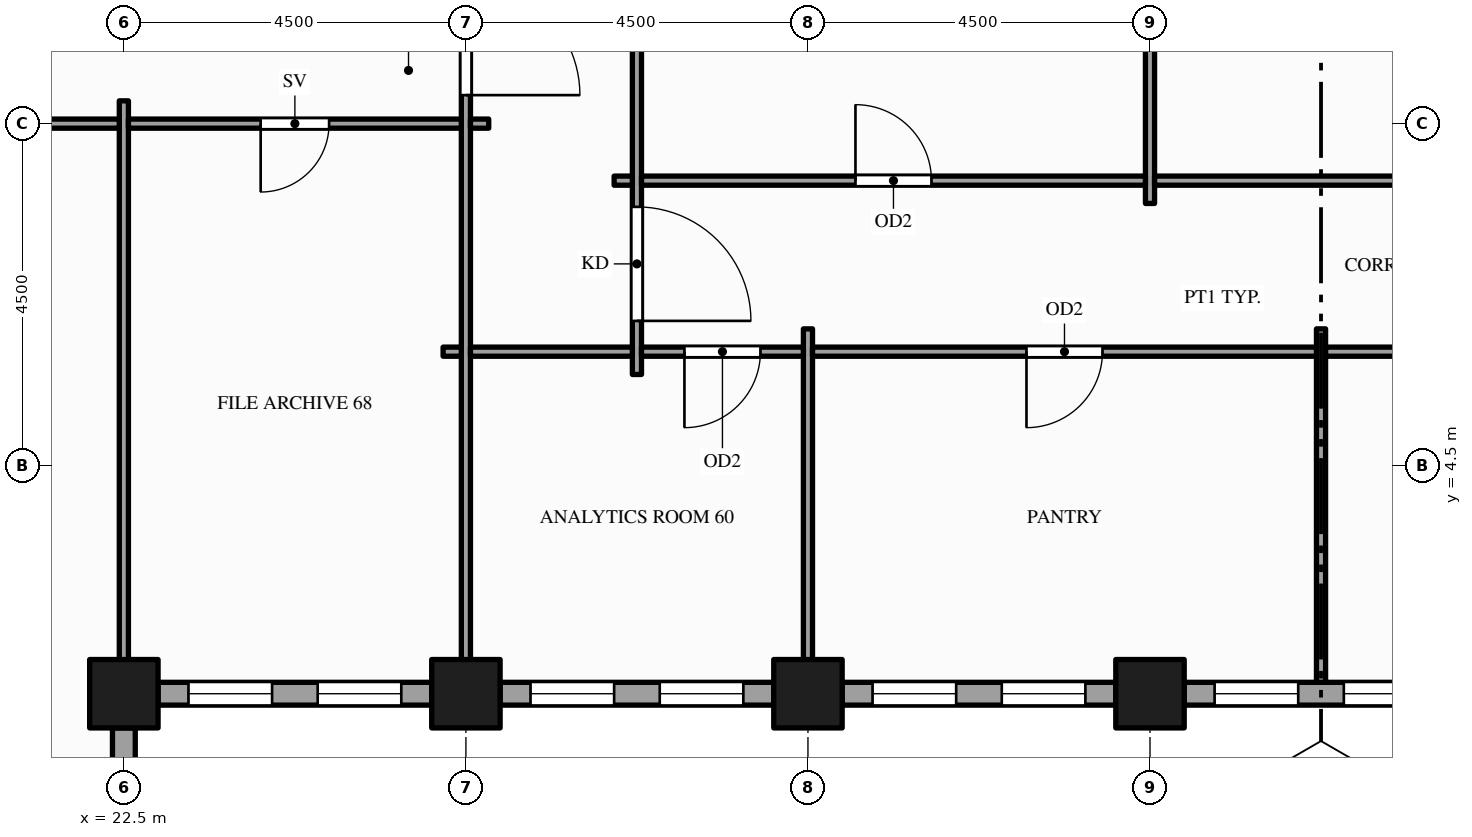
"""IFC4 building model, lengths in metres.
Left out: names, types, materials, properties, quantities, classifications, styles, units other than length and angle.
Written with IfcOpenShell. Run it as: python <this file> out.ifc"""

import sys

from ifc_helpers import new_model, si_unit, direction, frame, frame_2d, origin, origin_2d, place, context, subcontext, project, spatial, rectangle, hollow_rectangle, extrude, element, fill, save


model = new_model("IFC4")
c1 = context("Model", 3, precision=1e-05, world=origin(), true_north=direction((0.0, 1.0)))
c2 = subcontext(c1, "Body", "Model", "MODEL_VIEW")
j1 = project(units=[si_unit("LENGTHUNIT", "METRE"), si_unit("PLANEANGLEUNIT", "RADIAN")], contexts=[c1])
p1 = place(None, origin())
s1 = spatial("IfcSite", under=j1, at=p1, CompositionType="ELEMENT")
p2 = place(p1, origin())
s2 = spatial("IfcBuilding", under=s1, at=p2, CompositionType="ELEMENT")
p3 = place(p2, frame((0.0, 0.0, 179.0)))
s3 = spatial("IfcBuildingStorey", under=s2, at=p3, CompositionType="ELEMENT", Elevation=179.0)
for number, where, z_axis, x_axis in (
    (1, (22.5, 1.5, -0.15), (0.0, 0.0, 1.0), (1.0, 0.0, 0.0)),
    (2, (27.0, 1.5, -0.15), (0.0, 0.0, 1.0), (1.0, 0.0, 0.0)),
    (3, (31.5, 1.5, -0.15), (0.0, 0.0, 1.0), (1.0, 0.0, 0.0)),
    (4, (36.0, 1.5, -0.15), (0.0, 0.0, 1.0), (1.0, 0.0, 0.0)),
):
    element("IfcColumn", number, at=place(p3, frame(where, z_axis=z_axis, x_axis=x_axis)), inside=s3, PredefinedType="COLUMN", context=c2, shape_type="SweptSolid", body=[
        extrude(hollow_rectangle(XDim=0.9, YDim=0.9, WallThickness=0.045, at=origin_2d()), origin(), (0.0, 0.0, 1.0), 4.0),
    ])
p4 = place(p3, frame((22.5, 0.45, 0.0), z_axis=(0.0, 0.0, 1.0), x_axis=(0.0, 1.0, 0.0)))
e5 = element("IfcWall", 5, at=p4, inside=s3, PredefinedType="STANDARD", context=c2, shape_type="SweptSolid", body=[
    extrude(rectangle(XDim=0.6, YDim=0.3, at=frame_2d((0.3, 0.0))), origin(), (0.0, 0.0, 1.0), 3.149),
])
p5 = place(p3, frame((22.95, 1.5, 0.0), z_axis=(0.0, 0.0, 1.0), x_axis=(1.0, 0.0, 0.0)))
e6 = element("IfcWall", 6, at=p5, inside=s3, PredefinedType="STANDARD", context=c2, shape_type="SweptSolid", body=[
    extrude(rectangle(XDim=3.6, YDim=0.3, at=frame_2d((1.8, 0.0))), origin(), (0.0, 0.0, 1.0), 2.87),
])
p6 = place(p5, frame((0.4, 0.0, 0.9)))
e7 = element("IfcOpeningElement", 7, at=p6, cuts=e6, PredefinedType="OPENING", context=c2, shape_type="SweptSolid", body=[
    extrude(rectangle(XDim=1.1, YDim=1.75, at=frame_2d((0.55, 0.875))), frame((0.0, 0.16, 0.0), z_axis=(0.0, -1.0, 0.0), x_axis=(1.0, 0.0, 0.0)), (0.0, 0.0, 1.0), 0.32),
])
p7 = place(p5, frame((2.1, 0.0, 0.9)))
e8 = element("IfcOpeningElement", 8, at=p7, cuts=e6, PredefinedType="OPENING", context=c2, shape_type="SweptSolid", body=[
    extrude(rectangle(XDim=1.1, YDim=1.75, at=frame_2d((0.55, 0.875))), frame((0.0, 0.16, 0.0), z_axis=(0.0, -1.0, 0.0), x_axis=(1.0, 0.0, 0.0)), (0.0, 0.0, 1.0), 0.32),
])
p8 = place(p3, frame((27.45, 1.5, 0.0), z_axis=(0.0, 0.0, 1.0), x_axis=(1.0, 0.0, 0.0)))
e9 = element("IfcWall", 9, at=p8, inside=s3, PredefinedType="STANDARD", context=c2, shape_type="SweptSolid", body=[
    extrude(rectangle(XDim=3.6, YDim=0.3, at=frame_2d((1.8, 0.0))), origin(), (0.0, 0.0, 1.0), 2.87),
])
p9 = place(p8, frame((0.4, 0.0, 0.9)))
e10 = element("IfcOpeningElement", 10, at=p9, cuts=e9, PredefinedType="OPENING", context=c2, shape_type="SweptSolid", body=[
    extrude(rectangle(XDim=1.1, YDim=1.75, at=frame_2d((0.55, 0.875))), frame((0.0, 0.16, 0.0), z_axis=(0.0, -1.0, 0.0), x_axis=(1.0, 0.0, 0.0)), (0.0, 0.0, 1.0), 0.32),
])
p10 = place(p8, frame((2.1, 0.0, 0.9)))
e11 = element("IfcOpeningElement", 11, at=p10, cuts=e9, PredefinedType="OPENING", context=c2, shape_type="SweptSolid", body=[
    extrude(rectangle(XDim=1.1, YDim=1.75, at=frame_2d((0.55, 0.875))), frame((0.0, 0.16, 0.0), z_axis=(0.0, -1.0, 0.0), x_axis=(1.0, 0.0, 0.0)), (0.0, 0.0, 1.0), 0.32),
])
p11 = place(p3, frame((31.95, 1.5, 0.0), z_axis=(0.0, 0.0, 1.0), x_axis=(1.0, 0.0, 0.0)))
e12 = element("IfcWall", 12, at=p11, inside=s3, PredefinedType="STANDARD", context=c2, shape_type="SweptSolid", body=[
    extrude(rectangle(XDim=3.6, YDim=0.3, at=frame_2d((1.8, 0.0))), origin(), (0.0, 0.0, 1.0), 2.87),
])
p12 = place(p11, frame((0.4, 0.0, 0.9)))
e13 = element("IfcOpeningElement", 13, at=p12, cuts=e12, PredefinedType="OPENING", context=c2, shape_type="SweptSolid", body=[
    extrude(rectangle(XDim=1.1, YDim=1.75, at=frame_2d((0.55, 0.875))), frame((0.0, 0.16, 0.0), z_axis=(0.0, -1.0, 0.0), x_axis=(1.0, 0.0, 0.0)), (0.0, 0.0, 1.0), 0.32),
])
p13 = place(p11, frame((2.1, 0.0, 0.9)))
e14 = element("IfcOpeningElement", 14, at=p13, cuts=e12, PredefinedType="OPENING", context=c2, shape_type="SweptSolid", body=[
    extrude(rectangle(XDim=1.1, YDim=1.75, at=frame_2d((0.55, 0.875))), frame((0.0, 0.16, 0.0), z_axis=(0.0, -1.0, 0.0), x_axis=(1.0, 0.0, 0.0)), (0.0, 0.0, 1.0), 0.32),
])
p14 = place(p3, frame((36.45, 1.5, 0.0), z_axis=(0.0, 0.0, 1.0), x_axis=(1.0, 0.0, 0.0)))
e15 = element("IfcWall", 15, at=p14, inside=s3, PredefinedType="STANDARD", context=c2, shape_type="SweptSolid", body=[
    extrude(rectangle(XDim=3.6, YDim=0.3, at=frame_2d((1.8, 0.0))), origin(), (0.0, 0.0, 1.0), 2.87),
])
p15 = place(p14, frame((0.4, 0.0, 0.9)))
e16 = element("IfcOpeningElement", 16, at=p15, cuts=e15, PredefinedType="OPENING", context=c2, shape_type="SweptSolid", body=[
    extrude(rectangle(XDim=1.1, YDim=1.75, at=frame_2d((0.55, 0.875))), frame((0.0, 0.16, 0.0), z_axis=(0.0, -1.0, 0.0), x_axis=(1.0, 0.0, 0.0)), (0.0, 0.0, 1.0), 0.32),
])
p16 = place(p14, frame((2.1, 0.0, 0.9)))
e17 = element("IfcOpeningElement", 17, at=p16, cuts=e15, PredefinedType="OPENING", context=c2, shape_type="SweptSolid", body=[
    extrude(rectangle(XDim=1.1, YDim=1.75, at=frame_2d((0.55, 0.875))), frame((0.0, 0.16, 0.0), z_axis=(0.0, -1.0, 0.0), x_axis=(1.0, 0.0, 0.0)), (0.0, 0.0, 1.0), 0.32),
])
p17 = place(p3, frame((22.5, 1.65, 0.0), z_axis=(0.0, 0.0, 1.0), x_axis=(0.0, 1.0, 0.0)))
e18 = element("IfcWall", 18, at=p17, inside=s3, PredefinedType="PARTITIONING", context=c2, shape_type="SweptSolid", body=[
    extrude(rectangle(XDim=7.65, YDim=0.12, at=frame_2d((3.825, 0.0))), origin(), (0.0, 0.0, 1.0), 2.87),
])
p18 = place(p3, frame((27.0, 1.65, 0.0), z_axis=(0.0, 0.0, 1.0), x_axis=(0.0, 1.0, 0.0)))
e19 = element("IfcWall", 19, at=p18, inside=s3, PredefinedType="PARTITIONING", context=c2, shape_type="SweptSolid", body=[
    extrude(rectangle(XDim=22.2, YDim=0.12, at=frame_2d((11.1, 0.0))), origin(), (0.0, 0.0, 1.0), 2.87),
])
p19 = place(p18, frame((7.725, 0.0, 0.0)))
e20 = element("IfcOpeningElement", 20, at=p19, cuts=e19, PredefinedType="OPENING", context=c2, shape_type="SweptSolid", body=[
    extrude(rectangle(XDim=1.5, YDim=2.1, at=frame_2d((0.75, 1.05))), frame((0.0, 0.07, 0.0), z_axis=(0.0, -1.0, 0.0), x_axis=(1.0, 0.0, 0.0)), (0.0, 0.0, 1.0), 0.14),
])
p20 = place(p18, frame((13.125, 0.0, 0.0)))
e21 = element("IfcOpeningElement", 21, at=p20, cuts=e19, PredefinedType="OPENING", context=c2, shape_type="SweptSolid", body=[
    extrude(rectangle(XDim=1.2, YDim=2.1, at=frame_2d((0.6, 1.05))), frame((0.0, 0.07, 0.0), z_axis=(0.0, -1.0, 0.0), x_axis=(1.0, 0.0, 0.0)), (0.0, 0.0, 1.0), 0.14),
])
p21 = place(p3, frame((29.25, 5.7, 0.0), z_axis=(0.0, 0.0, 1.0), x_axis=(0.0, 1.0, 0.0)))
e22 = element("IfcWall", 22, at=p21, inside=s3, PredefinedType="PARTITIONING", context=c2, shape_type="SweptSolid", body=[
    extrude(rectangle(XDim=14.1, YDim=0.12, at=frame_2d((7.05, 0.0))), origin(), (0.0, 0.0, 1.0), 2.87),
])
p22 = place(p21, frame((0.705, 0.0, 0.0)))
e23 = element("IfcOpeningElement", 23, at=p22, cuts=e22, PredefinedType="OPENING", context=c2, shape_type="SweptSolid", body=[
    extrude(rectangle(XDim=1.5, YDim=2.1, at=frame_2d((0.75, 1.05))), frame((0.0, 0.07, 0.0), z_axis=(0.0, -1.0, 0.0), x_axis=(1.0, 0.0, 0.0)), (0.0, 0.0, 1.0), 0.14),
])
p23 = place(p21, frame((11.895, 0.0, 0.0)))
e24 = element("IfcOpeningElement", 24, at=p23, cuts=e22, PredefinedType="OPENING", context=c2, shape_type="SweptSolid", body=[
    extrude(rectangle(XDim=1.5, YDim=2.1, at=frame_2d((0.75, 1.05))), frame((0.0, 0.07, 0.0), z_axis=(0.0, -1.0, 0.0), x_axis=(1.0, 0.0, 0.0)), (0.0, 0.0, 1.0), 0.14),
])
p24 = place(p3, frame((31.5, 1.65, 0.0), z_axis=(0.0, 0.0, 1.0), x_axis=(0.0, 1.0, 0.0)))
e25 = element("IfcWall", 25, at=p24, inside=s3, PredefinedType="PARTITIONING", context=c2, shape_type="SweptSolid", body=[
    extrude(rectangle(XDim=4.65, YDim=0.12, at=frame_2d((2.325, 0.0))), origin(), (0.0, 0.0, 1.0), 2.87),
])
p25 = place(p3, frame((36.0, 7.95, 0.0), z_axis=(0.0, 0.0, 1.0), x_axis=(0.0, 1.0, 0.0)))
e26 = element("IfcWall", 26, at=p25, inside=s3, PredefinedType="PARTITIONING", context=c2, shape_type="SweptSolid", body=[
    extrude(rectangle(XDim=9.6, YDim=0.12, at=frame_2d((4.8, 0.0))), origin(), (0.0, 0.0, 1.0), 2.87),
])
p26 = place(p3, frame((38.25, 1.65, 0.0), z_axis=(0.0, 0.0, 1.0), x_axis=(0.0, 1.0, 0.0)))
e27 = element("IfcWall", 27, at=p26, inside=s3, PredefinedType="PARTITIONING", context=c2, shape_type="SweptSolid", body=[
    extrude(rectangle(XDim=4.65, YDim=0.12, at=frame_2d((2.325, 0.0))), origin(), (0.0, 0.0, 1.0), 2.87),
])
p27 = place(p3, frame((26.7, 6.0, 0.0), z_axis=(0.0, 0.0, 1.0), x_axis=(1.0, 0.0, 0.0)))
e28 = element("IfcWall", 28, at=p27, inside=s3, PredefinedType="PARTITIONING", context=c2, shape_type="SweptSolid", body=[
    extrude(rectangle(XDim=0.24, YDim=0.12, at=frame_2d((0.12, 0.0))), origin(), (0.0, 0.0, 1.0), 2.87),
])
p28 = place(p3, frame((27.06, 6.0, 0.0), z_axis=(0.0, 0.0, 1.0), x_axis=(1.0, 0.0, 0.0)))
e29 = element("IfcWall", 29, at=p28, inside=s3, PredefinedType="PARTITIONING", context=c2, shape_type="SweptSolid", body=[
    extrude(rectangle(XDim=2.13, YDim=0.12, at=frame_2d((1.065, 0.0))), origin(), (0.0, 0.0, 1.0), 2.87),
])
p29 = place(p3, frame((29.31, 6.0, 0.0), z_axis=(0.0, 0.0, 1.0), x_axis=(1.0, 0.0, 0.0)))
e30 = element("IfcWall", 30, at=p29, inside=s3, PredefinedType="PARTITIONING", context=c2, shape_type="SweptSolid", body=[
    extrude(rectangle(XDim=2.13, YDim=0.12, at=frame_2d((1.065, 0.0))), origin(), (0.0, 0.0, 1.0), 2.87),
])
p30 = place(p29, frame((0.565, 0.0, 0.0)))
e31 = element("IfcOpeningElement", 31, at=p30, cuts=e30, PredefinedType="OPENING", context=c2, shape_type="SweptSolid", body=[
    extrude(rectangle(XDim=1.0, YDim=2.1, at=frame_2d((0.5, 1.05))), frame((0.0, 0.07, 0.0), z_axis=(0.0, -1.0, 0.0), x_axis=(1.0, 0.0, 0.0)), (0.0, 0.0, 1.0), 0.14),
])
p31 = place(p3, frame((31.56, 6.0, 0.0), z_axis=(0.0, 0.0, 1.0), x_axis=(1.0, 0.0, 0.0)))
e32 = element("IfcWall", 32, at=p31, inside=s3, PredefinedType="PARTITIONING", context=c2, shape_type="SweptSolid", body=[
    extrude(rectangle(XDim=6.63, YDim=0.12, at=frame_2d((3.315, 0.0))), origin(), (0.0, 0.0, 1.0), 2.87),
])
p32 = place(p31, frame((2.815, 0.0, 0.0)))
e33 = element("IfcOpeningElement", 33, at=p32, cuts=e32, PredefinedType="OPENING", context=c2, shape_type="SweptSolid", body=[
    extrude(rectangle(XDim=1.0, YDim=2.1, at=frame_2d((0.5, 1.05))), frame((0.0, 0.07, 0.0), z_axis=(0.0, -1.0, 0.0), x_axis=(1.0, 0.0, 0.0)), (0.0, 0.0, 1.0), 0.14),
])
p33 = place(p3, frame((38.31, 6.0, 0.0), z_axis=(0.0, 0.0, 1.0), x_axis=(1.0, 0.0, 0.0)))
e34 = element("IfcWall", 34, at=p33, inside=s3, PredefinedType="PARTITIONING", context=c2, shape_type="SweptSolid", body=[
    extrude(rectangle(XDim=4.38, YDim=0.12, at=frame_2d((2.19, 0.0))), origin(), (0.0, 0.0, 1.0), 2.87),
])
p34 = place(p33, frame((1.69, 0.0, 0.0)))
e35 = element("IfcOpeningElement", 35, at=p34, cuts=e34, PredefinedType="OPENING", context=c2, shape_type="SweptSolid", body=[
    extrude(rectangle(XDim=1.0, YDim=2.1, at=frame_2d((0.5, 1.05))), frame((0.0, 0.07, 0.0), z_axis=(0.0, -1.0, 0.0), x_axis=(1.0, 0.0, 0.0)), (0.0, 0.0, 1.0), 0.14),
])
p35 = place(p3, frame((28.95, 8.25, 0.0), z_axis=(0.0, 0.0, 1.0), x_axis=(1.0, 0.0, 0.0)))
e36 = element("IfcWall", 36, at=p35, inside=s3, PredefinedType="PARTITIONING", context=c2, shape_type="SweptSolid", body=[
    extrude(rectangle(XDim=0.24, YDim=0.12, at=frame_2d((0.12, 0.0))), origin(), (0.0, 0.0, 1.0), 2.87),
])
p36 = place(p3, frame((29.31, 8.25, 0.0), z_axis=(0.0, 0.0, 1.0), x_axis=(1.0, 0.0, 0.0)))
e37 = element("IfcWall", 37, at=p36, inside=s3, PredefinedType="PARTITIONING", context=c2, shape_type="SweptSolid", body=[
    extrude(rectangle(XDim=6.63, YDim=0.12, at=frame_2d((3.315, 0.0))), origin(), (0.0, 0.0, 1.0), 2.87),
])
p37 = place(p36, frame((2.815, 0.0, 0.0)))
e38 = element("IfcOpeningElement", 38, at=p37, cuts=e37, PredefinedType="OPENING", context=c2, shape_type="SweptSolid", body=[
    extrude(rectangle(XDim=1.0, YDim=2.1, at=frame_2d((0.5, 1.05))), frame((0.0, 0.07, 0.0), z_axis=(0.0, -1.0, 0.0), x_axis=(1.0, 0.0, 0.0)), (0.0, 0.0, 1.0), 0.14),
])
p38 = place(p3, frame((36.06, 8.25, 0.0), z_axis=(0.0, 0.0, 1.0), x_axis=(1.0, 0.0, 0.0)))
e39 = element("IfcWall", 39, at=p38, inside=s3, PredefinedType="PARTITIONING", context=c2, shape_type="SweptSolid", body=[
    extrude(rectangle(XDim=4.38, YDim=0.12, at=frame_2d((2.19, 0.0))), origin(), (0.0, 0.0, 1.0), 2.87),
])
p39 = place(p3, frame((13.56, 9.0, 0.0), z_axis=(0.0, 0.0, 1.0), x_axis=(1.0, 0.0, 0.0)))
e40 = element("IfcWall", 40, at=p39, inside=s3, PredefinedType="PARTITIONING", context=c2, shape_type="SweptSolid", body=[
    extrude(rectangle(XDim=8.88, YDim=0.12, at=frame_2d((4.44, 0.0))), origin(), (0.0, 0.0, 1.0), 2.87),
])
p40 = place(p39, frame((3.54, 0.0, 0.0)))
e41 = element("IfcOpeningElement", 41, at=p40, cuts=e40, PredefinedType="OPENING", context=c2, shape_type="SweptSolid", body=[
    extrude(rectangle(XDim=1.8, YDim=2.1, at=frame_2d((0.9, 1.05))), frame((0.0, 0.07, 0.0), z_axis=(0.0, -1.0, 0.0), x_axis=(1.0, 0.0, 0.0)), (0.0, 0.0, 1.0), 0.14),
])
p41 = place(p3, frame((22.56, 9.0, 0.0), z_axis=(0.0, 0.0, 1.0), x_axis=(1.0, 0.0, 0.0)))
e42 = element("IfcWall", 42, at=p41, inside=s3, PredefinedType="PARTITIONING", context=c2, shape_type="SweptSolid", body=[
    extrude(rectangle(XDim=4.38, YDim=0.12, at=frame_2d((2.19, 0.0))), origin(), (0.0, 0.0, 1.0), 2.87),
])
p42 = place(p41, frame((1.74, 0.0, 0.0)))
e43 = element("IfcOpeningElement", 43, at=p42, cuts=e42, PredefinedType="OPENING", context=c2, shape_type="SweptSolid", body=[
    extrude(rectangle(XDim=0.9, YDim=2.1, at=frame_2d((0.45, 1.05))), frame((0.0, 0.07, 0.0), z_axis=(0.0, -1.0, 0.0), x_axis=(1.0, 0.0, 0.0)), (0.0, 0.0, 1.0), 0.14),
])
p43 = place(p3, frame((27.06, 9.0, 0.0), z_axis=(0.0, 0.0, 1.0), x_axis=(1.0, 0.0, 0.0)))
e44 = element("IfcWall", 44, at=p43, inside=s3, PredefinedType="PARTITIONING", context=c2, shape_type="SweptSolid", body=[
    extrude(rectangle(XDim=0.24, YDim=0.12, at=frame_2d((0.12, 0.0))), origin(), (0.0, 0.0, 1.0), 2.87),
])
p44 = place(p6, origin())
e45 = element("IfcWindow", 45, at=p44, inside=s3, PartitioningType="SINGLE_PANEL", PredefinedType="WINDOW", context=c2, shape_type="SweptSolid", body=[
    extrude(rectangle(XDim=1.1, YDim=1.75, at=frame_2d((0.55, 0.875))), frame((0.0, 0.03, 0.0), z_axis=(0.0, -1.0, 0.0), x_axis=(1.0, 0.0, 0.0)), (0.0, 0.0, 1.0), 0.06),
])
fill(e7, e45)
p45 = place(p7, origin())
e46 = element("IfcWindow", 46, at=p45, inside=s3, PartitioningType="SINGLE_PANEL", PredefinedType="WINDOW", context=c2, shape_type="SweptSolid", body=[
    extrude(rectangle(XDim=1.1, YDim=1.75, at=frame_2d((0.55, 0.875))), frame((0.0, 0.03, 0.0), z_axis=(0.0, -1.0, 0.0), x_axis=(1.0, 0.0, 0.0)), (0.0, 0.0, 1.0), 0.06),
])
fill(e8, e46)
p46 = place(p9, origin())
e47 = element("IfcWindow", 47, at=p46, inside=s3, PartitioningType="SINGLE_PANEL", PredefinedType="WINDOW", context=c2, shape_type="SweptSolid", body=[
    extrude(rectangle(XDim=1.1, YDim=1.75, at=frame_2d((0.55, 0.875))), frame((0.0, 0.03, 0.0), z_axis=(0.0, -1.0, 0.0), x_axis=(1.0, 0.0, 0.0)), (0.0, 0.0, 1.0), 0.06),
])
fill(e10, e47)
p47 = place(p10, origin())
e48 = element("IfcWindow", 48, at=p47, inside=s3, PartitioningType="SINGLE_PANEL", PredefinedType="WINDOW", context=c2, shape_type="SweptSolid", body=[
    extrude(rectangle(XDim=1.1, YDim=1.75, at=frame_2d((0.55, 0.875))), frame((0.0, 0.03, 0.0), z_axis=(0.0, -1.0, 0.0), x_axis=(1.0, 0.0, 0.0)), (0.0, 0.0, 1.0), 0.06),
])
fill(e11, e48)
p48 = place(p12, origin())
e49 = element("IfcWindow", 49, at=p48, inside=s3, PartitioningType="SINGLE_PANEL", PredefinedType="WINDOW", context=c2, shape_type="SweptSolid", body=[
    extrude(rectangle(XDim=1.1, YDim=1.75, at=frame_2d((0.55, 0.875))), frame((0.0, 0.03, 0.0), z_axis=(0.0, -1.0, 0.0), x_axis=(1.0, 0.0, 0.0)), (0.0, 0.0, 1.0), 0.06),
])
fill(e13, e49)
p49 = place(p13, origin())
e50 = element("IfcWindow", 50, at=p49, inside=s3, PartitioningType="SINGLE_PANEL", PredefinedType="WINDOW", context=c2, shape_type="SweptSolid", body=[
    extrude(rectangle(XDim=1.1, YDim=1.75, at=frame_2d((0.55, 0.875))), frame((0.0, 0.03, 0.0), z_axis=(0.0, -1.0, 0.0), x_axis=(1.0, 0.0, 0.0)), (0.0, 0.0, 1.0), 0.06),
])
fill(e14, e50)
p50 = place(p15, origin())
e51 = element("IfcWindow", 51, at=p50, inside=s3, PartitioningType="SINGLE_PANEL", PredefinedType="WINDOW", context=c2, shape_type="SweptSolid", body=[
    extrude(rectangle(XDim=1.1, YDim=1.75, at=frame_2d((0.55, 0.875))), frame((0.0, 0.03, 0.0), z_axis=(0.0, -1.0, 0.0), x_axis=(1.0, 0.0, 0.0)), (0.0, 0.0, 1.0), 0.06),
])
fill(e16, e51)
p51 = place(p16, origin())
e52 = element("IfcWindow", 52, at=p51, inside=s3, PartitioningType="SINGLE_PANEL", PredefinedType="WINDOW", context=c2, shape_type="SweptSolid", body=[
    extrude(rectangle(XDim=1.1, YDim=1.75, at=frame_2d((0.55, 0.875))), frame((0.0, 0.03, 0.0), z_axis=(0.0, -1.0, 0.0), x_axis=(1.0, 0.0, 0.0)), (0.0, 0.0, 1.0), 0.06),
])
fill(e17, e52)
p52 = place(p19, origin())
e53 = element("IfcDoor", 53, at=p52, inside=s3, OperationType="SINGLE_SWING_LEFT", PredefinedType="DOOR", context=c2, shape_type="SweptSolid", body=[
    extrude(rectangle(XDim=1.5, YDim=2.1, at=frame_2d((0.75, 1.05))), frame((0.0, 0.025, 0.0), z_axis=(0.0, -1.0, 0.0), x_axis=(1.0, 0.0, 0.0)), (0.0, 0.0, 1.0), 0.05),
])
fill(e20, e53)
p53 = place(p22, origin())
e54 = element("IfcDoor", 54, at=p53, inside=s3, OperationType="SINGLE_SWING_LEFT", PredefinedType="DOOR", context=c2, shape_type="SweptSolid", body=[
    extrude(rectangle(XDim=1.5, YDim=2.1, at=frame_2d((0.75, 1.05))), frame((0.0, 0.025, 0.0), z_axis=(0.0, -1.0, 0.0), x_axis=(1.0, 0.0, 0.0)), (0.0, 0.0, 1.0), 0.05),
])
fill(e23, e54)
p54 = place(p42, origin())
e55 = element("IfcDoor", 55, at=p54, inside=s3, OperationType="SINGLE_SWING_LEFT", PredefinedType="DOOR", context=c2, shape_type="SweptSolid", body=[
    extrude(rectangle(XDim=0.9, YDim=2.1, at=frame_2d((0.45, 1.05))), frame((0.0, 0.025, 0.0), z_axis=(0.0, -1.0, 0.0), x_axis=(1.0, 0.0, 0.0)), (0.0, 0.0, 1.0), 0.05),
])
fill(e43, e55)
p55 = place(p37, origin())
e56 = element("IfcDoor", 56, at=p55, inside=s3, OperationType="SINGLE_SWING_LEFT", PredefinedType="DOOR", context=c2, shape_type="SweptSolid", body=[
    extrude(rectangle(XDim=1.0, YDim=2.1, at=frame_2d((0.5, 1.05))), frame((0.0, 0.025, 0.0), z_axis=(0.0, -1.0, 0.0), x_axis=(1.0, 0.0, 0.0)), (0.0, 0.0, 1.0), 0.05),
])
fill(e38, e56)
p56 = place(p30, origin())
e57 = element("IfcDoor", 57, at=p56, inside=s3, OperationType="SINGLE_SWING_LEFT", PredefinedType="DOOR", context=c2, shape_type="SweptSolid", body=[
    extrude(rectangle(XDim=1.0, YDim=2.1, at=frame_2d((0.5, 1.05))), frame((0.0, 0.025, 0.0), z_axis=(0.0, -1.0, 0.0), x_axis=(1.0, 0.0, 0.0)), (0.0, 0.0, 1.0), 0.05),
])
fill(e31, e57)
p57 = place(p32, origin())
e58 = element("IfcDoor", 58, at=p57, inside=s3, OperationType="SINGLE_SWING_LEFT", PredefinedType="DOOR", context=c2, shape_type="SweptSolid", body=[
    extrude(rectangle(XDim=1.0, YDim=2.1, at=frame_2d((0.5, 1.05))), frame((0.0, 0.025, 0.0), z_axis=(0.0, -1.0, 0.0), x_axis=(1.0, 0.0, 0.0)), (0.0, 0.0, 1.0), 0.05),
])
fill(e33, e58)
save(model, sys.argv[1])
